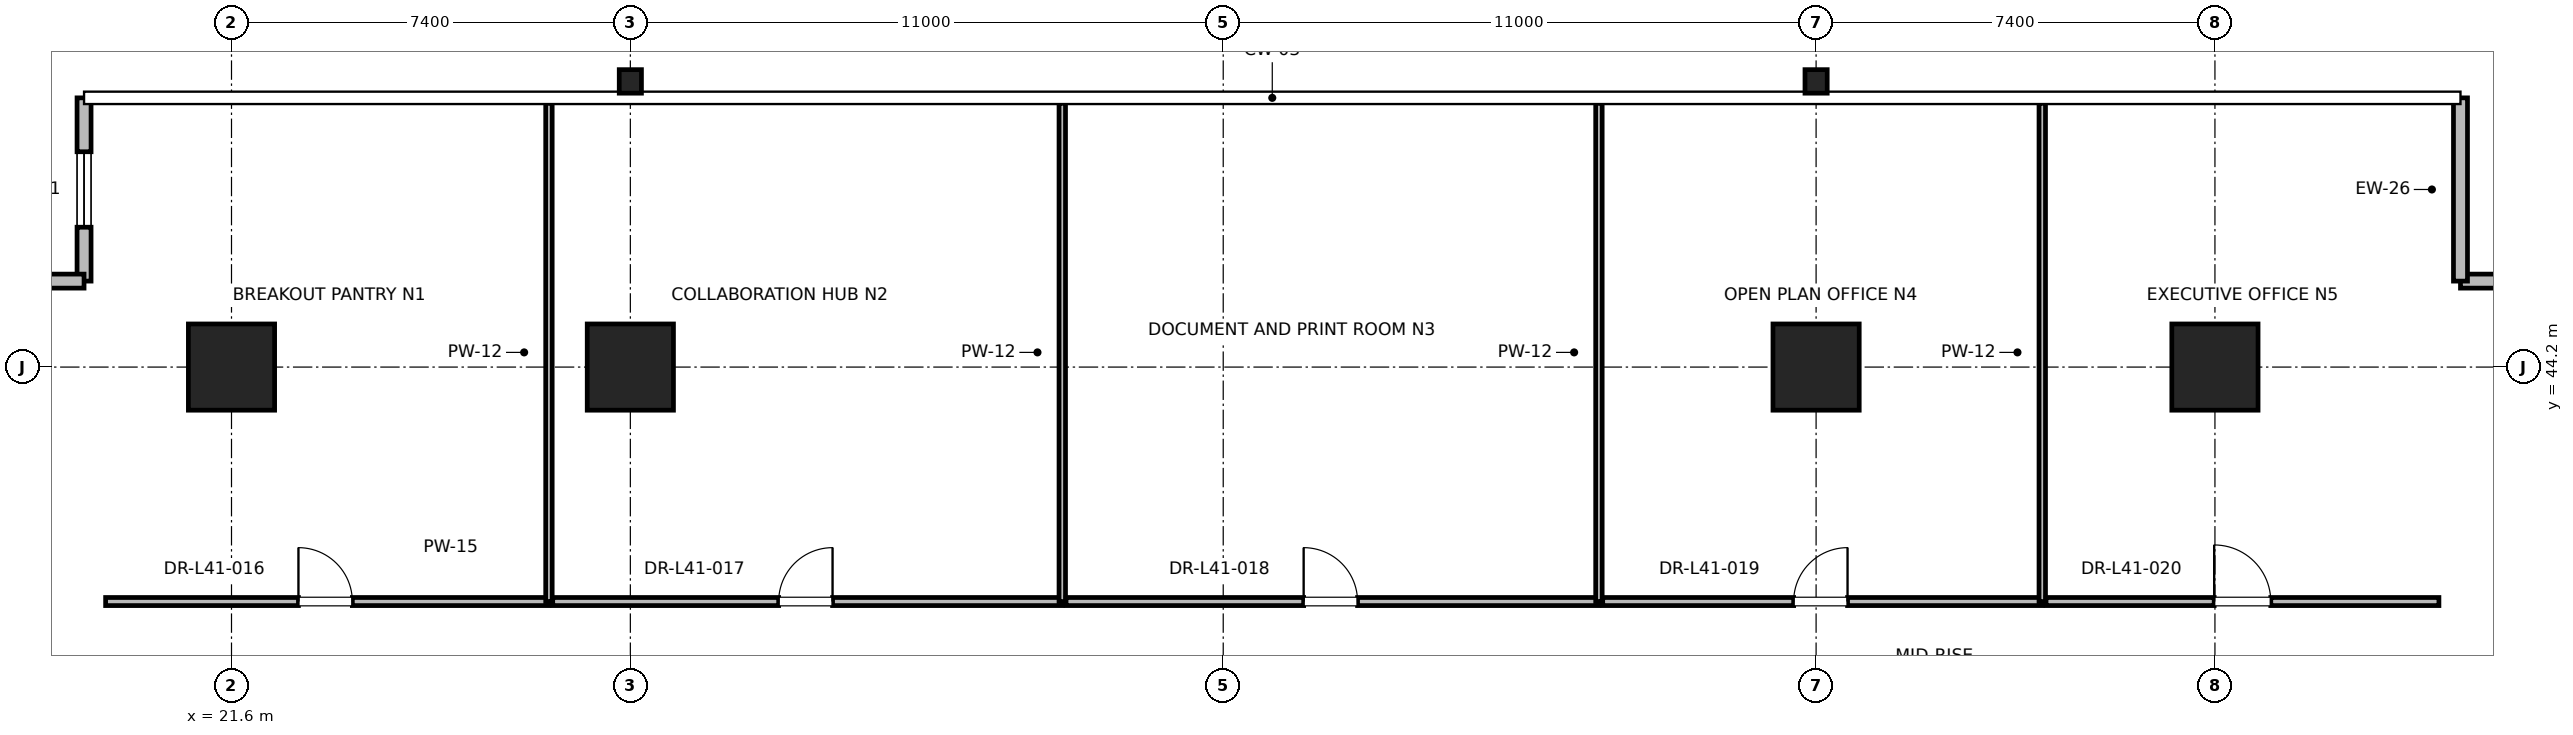
"""IFC4 building model, lengths in metres.
Left out: names, types, materials, properties, quantities, classifications, styles, units other than length and angle.
Written with IfcOpenShell. Run it as: python <this file> out.ifc"""

import sys

from ifc_helpers import new_model, si_unit, direction, frame, frame_2d, origin, origin_2d, place, context, subcontext, project, spatial, rectangle, i_section, extrude, element, fill, save


model = new_model("IFC4")
c1 = context("Model", 3, precision=1e-05, world=origin(), true_north=direction((0.0, 1.0)))
c2 = subcontext(c1, "Body", "Model", "MODEL_VIEW")
j1 = project(units=[si_unit("LENGTHUNIT", "METRE"), si_unit("PLANEANGLEUNIT", "RADIAN")], contexts=[c1])
p1 = place(None, origin())
s1 = spatial("IfcSite", under=j1, at=p1, CompositionType="ELEMENT")
p2 = place(p1, origin())
s2 = spatial("IfcBuilding", under=s1, at=p2, CompositionType="ELEMENT")
p3 = place(p2, frame((0.0, 0.0, 176.4)))
s3 = spatial("IfcBuildingStorey", under=s2, at=p3, CompositionType="ELEMENT", Elevation=176.4)
for number, where, z_axis, x_axis in (
    (1, (29.0, 44.2, 0.0), (0.0, 0.0, 1.0), (1.0, 0.0, 0.0)),
    (2, (51.0, 44.2, 0.0), (0.0, 0.0, 1.0), (1.0, 0.0, 0.0)),
    (3, (21.6, 44.2, 0.0), (0.0, 0.0, 1.0), (1.0, 0.0, 0.0)),
    (4, (58.4, 44.2, 0.0), (0.0, 0.0, 1.0), (1.0, 0.0, 0.0)),
):
    element("IfcColumn", number, at=place(p3, frame(where, z_axis=z_axis, x_axis=x_axis)), inside=s3, PredefinedType="COLUMN", context=c2, shape_type="SweptSolid", body=[
        extrude(rectangle(XDim=1.6, YDim=1.6, at=origin_2d()), origin(), (0.0, 0.0, 1.0), 4.0),
    ])
for number, where, z_axis, x_axis in (
    (5, (29.0, 49.5, 0.0), (0.0, 0.0, 1.0), (1.0, 0.0, 0.0)),
    (6, (51.0, 49.5, 0.0), (0.0, 0.0, 1.0), (1.0, 0.0, 0.0)),
):
    element("IfcColumn", number, at=place(p3, frame(where, z_axis=z_axis, x_axis=x_axis)), inside=s3, PredefinedType="COLUMN", context=c2, shape_type="SweptSolid", body=[
        extrude(i_section(OverallWidth=0.412, OverallDepth=0.437, WebThickness=0.036, FlangeThickness=0.058, FilletRadius=0.015, at=origin_2d()), origin(), (0.0, 0.0, 1.0), 4.0),
    ])
p4 = place(p3, frame((66.756, 45.795, 0.0), z_axis=(0.0, 0.0, 1.0), x_axis=(-1.0, 0.0, 0.0)))
e7 = element("IfcWall", 7, at=p4, inside=s3, PredefinedType="PARAPET", context=c2, shape_type="SweptSolid", body=[
    extrude(rectangle(XDim=3.8, YDim=0.26, at=frame_2d((1.9, 0.0))), origin(), (0.0, 0.0, 1.0), 3.775),
])
p5 = place(p4, frame((1.2, 0.0, 0.85)))
e8 = element("IfcOpeningElement", 8, at=p5, cuts=e7, PredefinedType="OPENING", context=c2, shape_type="SweptSolid", body=[
    extrude(rectangle(XDim=1.4, YDim=2.0, at=frame_2d((0.7, 1.0))), frame((0.0, 0.13, 0.0), z_axis=(0.0, -1.0, 0.0), x_axis=(1.0, 0.0, 0.0)), (0.0, 0.0, 1.0), 0.26),
])
p6 = place(p3, frame((62.956, 45.795, 0.0), z_axis=(0.0, 0.0, 1.0), x_axis=(0.0, 1.0, 0.0)))
e9 = element("IfcWall", 9, at=p6, inside=s3, PredefinedType="PARAPET", context=c2, shape_type="SweptSolid", body=[
    extrude(rectangle(XDim=3.4, YDim=0.26, at=frame_2d((1.7, 0.0))), origin(), (0.0, 0.0, 1.0), 3.775),
])
p7 = place(p3, frame((18.864, 49.195, 0.0), z_axis=(0.0, 0.0, 1.0), x_axis=(0.0, -1.0, 0.0)))
e10 = element("IfcWall", 10, at=p7, inside=s3, PredefinedType="PARAPET", context=c2, shape_type="SweptSolid", body=[
    extrude(rectangle(XDim=3.4, YDim=0.26, at=frame_2d((1.7, 0.0))), origin(), (0.0, 0.0, 1.0), 3.775),
])
p8 = place(p7, frame((1.0, 0.0, 0.85)))
e11 = element("IfcOpeningElement", 11, at=p8, cuts=e10, PredefinedType="OPENING", context=c2, shape_type="SweptSolid", body=[
    extrude(rectangle(XDim=1.4, YDim=2.0, at=frame_2d((0.7, 1.0))), frame((0.0, 0.13, 0.0), z_axis=(0.0, -1.0, 0.0), x_axis=(1.0, 0.0, 0.0)), (0.0, 0.0, 1.0), 0.26),
])
p9 = place(p3, frame((18.864, 45.795, 0.0), z_axis=(0.0, 0.0, 1.0), x_axis=(-1.0, 0.0, 0.0)))
e12 = element("IfcWall", 12, at=p9, inside=s3, PredefinedType="PARAPET", context=c2, shape_type="SweptSolid", body=[
    extrude(rectangle(XDim=3.8, YDim=0.26, at=frame_2d((1.9, 0.0))), origin(), (0.0, 0.0, 1.0), 3.775),
])
p10 = place(p3, frame((19.264, 39.85, 0.0), z_axis=(0.0, 0.0, 1.0), x_axis=(1.0, 0.0, 0.0)))
e13 = element("IfcWall", 13, at=p10, inside=s3, PredefinedType="PARTITIONING", context=c2, shape_type="SweptSolid", body=[
    extrude(rectangle(XDim=8.225, YDim=0.15, at=frame_2d((4.113, 0.0))), origin(), (0.0, 0.0, 1.0), 2.85),
])
p11 = place(p10, frame((3.578, 0.0, 0.0)))
e14 = element("IfcOpeningElement", 14, at=p11, cuts=e13, PredefinedType="OPENING", context=c2, shape_type="SweptSolid", body=[
    extrude(rectangle(XDim=1.0, YDim=2.15, at=frame_2d((0.5, 1.075))), frame((0.0, 0.075, 0.0), z_axis=(0.0, -1.0, 0.0), x_axis=(1.0, 0.0, 0.0)), (0.0, 0.0, 1.0), 0.15),
])
p12 = place(p3, frame((27.49, 39.85, 0.0), z_axis=(0.0, 0.0, 1.0), x_axis=(0.0, 1.0, 0.0)))
e15 = element("IfcWall", 15, at=p12, inside=s3, PredefinedType="PARTITIONING", context=c2, shape_type="SweptSolid", body=[
    extrude(rectangle(XDim=9.245, YDim=0.12, at=frame_2d((4.623, 0.0))), origin(), (0.0, 0.0, 1.0), 2.85),
])
p13 = place(p3, frame((27.56, 39.85, 0.0), z_axis=(0.0, 0.0, 1.0), x_axis=(1.0, 0.0, 0.0)))
e16 = element("IfcWall", 16, at=p13, inside=s3, PredefinedType="PARTITIONING", context=c2, shape_type="SweptSolid", body=[
    extrude(rectangle(XDim=9.454, YDim=0.15, at=frame_2d((4.727, 0.0))), origin(), (0.0, 0.0, 1.0), 2.85),
])
p14 = place(p13, frame((4.192, 0.0, 0.0)))
e17 = element("IfcOpeningElement", 17, at=p14, cuts=e16, PredefinedType="OPENING", context=c2, shape_type="SweptSolid", body=[
    extrude(rectangle(XDim=1.0, YDim=2.15, at=frame_2d((0.5, 1.075))), frame((0.0, 0.075, 0.0), z_axis=(0.0, -1.0, 0.0), x_axis=(1.0, 0.0, 0.0)), (0.0, 0.0, 1.0), 0.15),
])
p15 = place(p3, frame((37.014, 39.85, 0.0), z_axis=(0.0, 0.0, 1.0), x_axis=(0.0, 1.0, 0.0)))
e18 = element("IfcWall", 18, at=p15, inside=s3, PredefinedType="PARTITIONING", context=c2, shape_type="SweptSolid", body=[
    extrude(rectangle(XDim=9.245, YDim=0.12, at=frame_2d((4.623, 0.0))), origin(), (0.0, 0.0, 1.0), 2.405),
])
p16 = place(p3, frame((37.084, 39.85, 0.0), z_axis=(0.0, 0.0, 1.0), x_axis=(1.0, 0.0, 0.0)))
e19 = element("IfcWall", 19, at=p16, inside=s3, PredefinedType="PARTITIONING", context=c2, shape_type="SweptSolid", body=[
    extrude(rectangle(XDim=9.887, YDim=0.15, at=frame_2d((4.943, 0.0))), origin(), (0.0, 0.0, 1.0), 2.85),
])
p17 = place(p16, frame((4.408, 0.0, 0.0)))
e20 = element("IfcOpeningElement", 20, at=p17, cuts=e19, PredefinedType="OPENING", context=c2, shape_type="SweptSolid", body=[
    extrude(rectangle(XDim=1.0, YDim=2.15, at=frame_2d((0.5, 1.075))), frame((0.0, 0.075, 0.0), z_axis=(0.0, -1.0, 0.0), x_axis=(1.0, 0.0, 0.0)), (0.0, 0.0, 1.0), 0.15),
])
p18 = place(p3, frame((46.971, 39.85, 0.0), z_axis=(0.0, 0.0, 1.0), x_axis=(0.0, 1.0, 0.0)))
e21 = element("IfcWall", 21, at=p18, inside=s3, PredefinedType="PARTITIONING", context=c2, shape_type="SweptSolid", body=[
    extrude(rectangle(XDim=9.245, YDim=0.12, at=frame_2d((4.623, 0.0))), origin(), (0.0, 0.0, 1.0), 2.405),
])
p19 = place(p3, frame((47.041, 39.85, 0.0), z_axis=(0.0, 0.0, 1.0), x_axis=(1.0, 0.0, 0.0)))
e22 = element("IfcWall", 22, at=p19, inside=s3, PredefinedType="PARTITIONING", context=c2, shape_type="SweptSolid", body=[
    extrude(rectangle(XDim=8.156, YDim=0.15, at=frame_2d((4.078, 0.0))), origin(), (0.0, 0.0, 1.0), 2.85),
])
p20 = place(p19, frame((3.543, 0.0, 0.0)))
e23 = element("IfcOpeningElement", 23, at=p20, cuts=e22, PredefinedType="OPENING", context=c2, shape_type="SweptSolid", body=[
    extrude(rectangle(XDim=1.0, YDim=2.15, at=frame_2d((0.5, 1.075))), frame((0.0, 0.075, 0.0), z_axis=(0.0, -1.0, 0.0), x_axis=(1.0, 0.0, 0.0)), (0.0, 0.0, 1.0), 0.15),
])
p21 = place(p3, frame((55.196, 39.85, 0.0), z_axis=(0.0, 0.0, 1.0), x_axis=(0.0, 1.0, 0.0)))
e24 = element("IfcWall", 24, at=p21, inside=s3, PredefinedType="PARTITIONING", context=c2, shape_type="SweptSolid", body=[
    extrude(rectangle(XDim=9.245, YDim=0.12, at=frame_2d((4.623, 0.0))), origin(), (0.0, 0.0, 1.0), 2.85),
])
p22 = place(p3, frame((55.266, 39.85, 0.0), z_axis=(0.0, 0.0, 1.0), x_axis=(1.0, 0.0, 0.0)))
e25 = element("IfcWall", 25, at=p22, inside=s3, PredefinedType="PARTITIONING", context=c2, shape_type="SweptSolid", body=[
    extrude(rectangle(XDim=7.29, YDim=0.15, at=frame_2d((3.645, 0.0))), origin(), (0.0, 0.0, 1.0), 2.85),
])
p23 = place(p22, frame((3.12, 0.0, 0.0)))
e26 = element("IfcOpeningElement", 26, at=p23, cuts=e25, PredefinedType="OPENING", context=c2, shape_type="SweptSolid", body=[
    extrude(rectangle(XDim=1.05, YDim=2.2, at=frame_2d((0.525, 1.1))), frame((0.0, 0.075, 0.0), z_axis=(0.0, -1.0, 0.0), x_axis=(1.0, 0.0, 0.0)), (0.0, 0.0, 1.0), 0.15),
])
p24 = place(p8, origin())
e27 = element("IfcWindow", 27, at=p24, inside=s3, PartitioningType="SINGLE_PANEL", PredefinedType="WINDOW", context=c2, shape_type="SweptSolid", body=[
    extrude(rectangle(XDim=1.4, YDim=2.0, at=frame_2d((0.7, 1.0))), frame((0.0, 0.03, 0.0), z_axis=(0.0, -1.0, 0.0), x_axis=(1.0, 0.0, 0.0)), (0.0, 0.0, 1.0), 0.06),
])
fill(e11, e27)
p25 = place(p11, origin())
e28 = element("IfcDoor", 28, at=p25, inside=s3, OperationType="SINGLE_SWING_LEFT", PredefinedType="DOOR", context=c2, shape_type="SweptSolid", body=[
    extrude(rectangle(XDim=1.0, YDim=2.15, at=frame_2d((0.5, 1.075))), frame((0.0, 0.025, 0.0), z_axis=(0.0, -1.0, 0.0), x_axis=(1.0, 0.0, 0.0)), (0.0, 0.0, 1.0), 0.05),
])
fill(e14, e28)
p26 = place(p14, origin())
e29 = element("IfcDoor", 29, at=p26, inside=s3, OperationType="SINGLE_SWING_RIGHT", PredefinedType="DOOR", context=c2, shape_type="SweptSolid", body=[
    extrude(rectangle(XDim=1.0, YDim=2.15, at=frame_2d((0.5, 1.075))), frame((0.0, 0.025, 0.0), z_axis=(0.0, -1.0, 0.0), x_axis=(1.0, 0.0, 0.0)), (0.0, 0.0, 1.0), 0.05),
])
fill(e17, e29)
p27 = place(p17, origin())
e30 = element("IfcDoor", 30, at=p27, inside=s3, OperationType="SINGLE_SWING_LEFT", PredefinedType="DOOR", context=c2, shape_type="SweptSolid", body=[
    extrude(rectangle(XDim=1.0, YDim=2.15, at=frame_2d((0.5, 1.075))), frame((0.0, 0.025, 0.0), z_axis=(0.0, -1.0, 0.0), x_axis=(1.0, 0.0, 0.0)), (0.0, 0.0, 1.0), 0.05),
])
fill(e20, e30)
p28 = place(p20, origin())
e31 = element("IfcDoor", 31, at=p28, inside=s3, OperationType="SINGLE_SWING_RIGHT", PredefinedType="DOOR", context=c2, shape_type="SweptSolid", body=[
    extrude(rectangle(XDim=1.0, YDim=2.15, at=frame_2d((0.5, 1.075))), frame((0.0, 0.025, 0.0), z_axis=(0.0, -1.0, 0.0), x_axis=(1.0, 0.0, 0.0)), (0.0, 0.0, 1.0), 0.05),
])
fill(e23, e31)
p29 = place(p23, origin())
e32 = element("IfcDoor", 32, at=p29, inside=s3, OperationType="SINGLE_SWING_LEFT", PredefinedType="DOOR", context=c2, shape_type="SweptSolid", body=[
    extrude(rectangle(XDim=1.05, YDim=2.2, at=frame_2d((0.525, 1.1))), frame((0.0, 0.025, 0.0), z_axis=(0.0, -1.0, 0.0), x_axis=(1.0, 0.0, 0.0)), (0.0, 0.0, 1.0), 0.05),
])
fill(e26, e32)
save(model, sys.argv[1])
